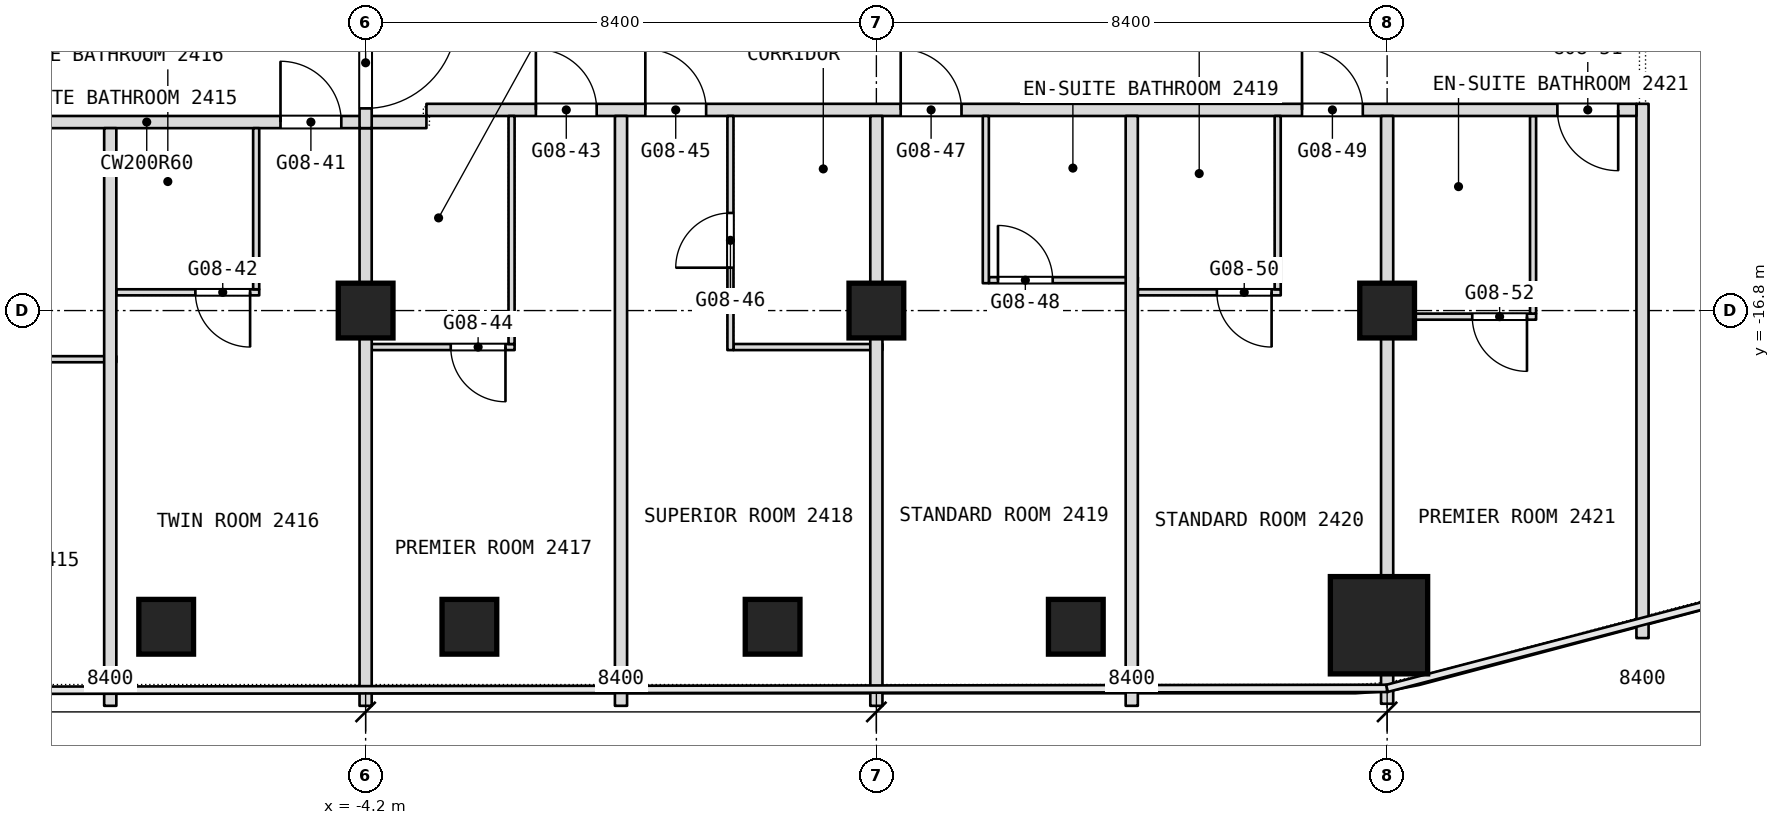
"""IFC4 building model, lengths in metres.
Left out: names, types, materials, properties, quantities, classifications, styles, units other than length and angle.
Written with IfcOpenShell. Run it as: python <this file> out.ifc"""

import sys

from ifc_helpers import new_model, si_unit, direction, frame, frame_2d, origin, origin_2d, place, context, subcontext, project, spatial, rectangle, extrude, element, fill, save


model = new_model("IFC4")
c1 = context("Model", 3, precision=1e-05, world=origin(), true_north=direction((0.0, 1.0)))
c2 = subcontext(c1, "Body", "Model", "MODEL_VIEW")
j1 = project(units=[si_unit("LENGTHUNIT", "METRE"), si_unit("PLANEANGLEUNIT", "RADIAN")], contexts=[c1])
p1 = place(None, origin())
s1 = spatial("IfcSite", under=j1, at=p1, CompositionType="ELEMENT")
p2 = place(p1, origin())
s2 = spatial("IfcBuilding", under=s1, at=p2, CompositionType="ELEMENT")
p3 = place(p2, frame((0.0, 0.0, 112.1)))
s3 = spatial("IfcBuildingStorey", under=s2, at=p3, CompositionType="ELEMENT", Elevation=112.1)
p4 = place(p3, frame((12.466, -21.975, 0.0), z_axis=(0.0, 0.0, 1.0), x_axis=(1.0, 0.0, 0.0)))
e1 = element("IfcColumn", 1, at=p4, inside=s3, PredefinedType="COLUMN", context=c2, shape_type="SweptSolid", body=[
    extrude(rectangle(XDim=1.6, YDim=1.6, at=origin_2d()), origin(), (0.0, 0.0, 1.0), 3.6),
])
for number, where, z_axis, x_axis in (
    (2, (-4.2, -16.8, 0.0), (0.0, 0.0, 1.0), (1.0, 0.0, 0.0)),
    (3, (4.2, -16.8, 0.0), (0.0, 0.0, 1.0), (1.0, 0.0, 0.0)),
    (4, (12.6, -16.8, 0.0), (0.0, 0.0, 1.0), (1.0, 0.0, 0.0)),
    (5, (7.48, -22.0, 0.0), (0.0, 0.0, 1.0), (1.0, 0.0, 0.0)),
    (6, (2.493, -22.0, 0.0), (0.0, 0.0, 1.0), (1.0, 0.0, 0.0)),
    (7, (-2.493, -22.0, 0.0), (0.0, 0.0, 1.0), (1.0, 0.0, 0.0)),
    (8, (-7.48, -22.0, 0.0), (0.0, 0.0, 1.0), (1.0, 0.0, 0.0)),
):
    element("IfcColumn", number, at=place(p3, frame(where, z_axis=z_axis, x_axis=x_axis)), inside=s3, PredefinedType="COLUMN", context=c2, shape_type="SweptSolid", body=[
        extrude(rectangle(XDim=0.9, YDim=0.9, at=origin_2d()), origin(), (0.0, 0.0, 1.0), 3.6),
    ])
p5 = place(p3, frame((-10.75, -17.6, 0.0), z_axis=(0.0, 0.0, 1.0), x_axis=(1.0, 0.0, 0.0)))
e9 = element("IfcWall", 9, at=p5, inside=s3, PredefinedType="PARTITIONING", context=c2, shape_type="SweptSolid", body=[
    extrude(rectangle(XDim=2.45, YDim=0.1, at=frame_2d((1.225, 0.0))), origin(), (0.0, 0.0, 1.0), 3.34),
])
p6 = place(p5, frame((0.15, 0.0, 0.0)))
e10 = element("IfcOpeningElement", 10, at=p6, cuts=e9, PredefinedType="OPENING", context=c2, shape_type="SweptSolid", body=[
    extrude(rectangle(XDim=0.9, YDim=2.1, at=frame_2d((0.45, 1.05))), frame((0.0, 0.05, 0.0), z_axis=(0.0, -1.0, 0.0), x_axis=(1.0, 0.0, 0.0)), (0.0, 0.0, 1.0), 0.1),
])
p7 = place(p3, frame((-4.1, -17.4, 0.0), z_axis=(0.0, 0.0, 1.0), x_axis=(1.0, 0.0, 0.0)))
e11 = element("IfcWall", 11, at=p7, inside=s3, PredefinedType="PARTITIONING", context=c2, shape_type="SweptSolid", body=[
    extrude(rectangle(XDim=2.35, YDim=0.1, at=frame_2d((1.175, 0.0))), origin(), (0.0, 0.0, 1.0), 3.34),
])
p8 = place(p7, frame((1.3, 0.0, 0.0)))
e12 = element("IfcOpeningElement", 12, at=p8, cuts=e11, PredefinedType="OPENING", context=c2, shape_type="SweptSolid", body=[
    extrude(rectangle(XDim=0.9, YDim=2.1, at=frame_2d((0.45, 1.05))), frame((0.0, 0.05, 0.0), z_axis=(0.0, -1.0, 0.0), x_axis=(1.0, 0.0, 0.0)), (0.0, 0.0, 1.0), 0.1),
])
p9 = place(p3, frame((1.85, -17.4, 0.0), z_axis=(0.0, 0.0, 1.0), x_axis=(1.0, 0.0, 0.0)))
e13 = element("IfcWall", 13, at=p9, inside=s3, PredefinedType="PARTITIONING", context=c2, shape_type="SweptSolid", body=[
    extrude(rectangle(XDim=2.45, YDim=0.1, at=frame_2d((1.225, 0.0))), origin(), (0.0, 0.0, 1.0), 3.34),
])
p10 = place(p3, frame((12.7, -16.9, 0.0), z_axis=(0.0, 0.0, 1.0), x_axis=(1.0, 0.0, 0.0)))
e14 = element("IfcWall", 14, at=p10, inside=s3, PredefinedType="PARTITIONING", context=c2, shape_type="SweptSolid", body=[
    extrude(rectangle(XDim=2.35, YDim=0.1, at=frame_2d((1.175, 0.0))), origin(), (0.0, 0.0, 1.0), 2.89),
])
p11 = place(p10, frame((1.3, 0.0, 0.0)))
e15 = element("IfcOpeningElement", 15, at=p11, cuts=e14, PredefinedType="OPENING", context=c2, shape_type="SweptSolid", body=[
    extrude(rectangle(XDim=0.9, YDim=2.1, at=frame_2d((0.45, 1.05))), frame((0.0, 0.05, 0.0), z_axis=(0.0, -1.0, 0.0), x_axis=(1.0, 0.0, 0.0)), (0.0, 0.0, 1.0), 0.1),
])
p12 = place(p3, frame((16.8, -22.186, 0.0), z_axis=(0.0, 0.0, 1.0), x_axis=(0.0, 1.0, 0.0)))
e16 = element("IfcWall", 16, at=p12, inside=s3, PredefinedType="PARTITIONING", context=c2, shape_type="SweptSolid", body=[
    extrude(rectangle(XDim=8.786, YDim=0.2, at=frame_2d((4.393, 0.0))), origin(), (0.0, 0.0, 1.0), 3.34),
])
p13 = place(p3, frame((-8.3, -16.5, 0.0), z_axis=(0.0, 0.0, 1.0), x_axis=(1.0, 0.0, 0.0)))
e17 = element("IfcWall", 17, at=p13, inside=s3, PredefinedType="PARTITIONING", context=c2, shape_type="SweptSolid", body=[
    extrude(rectangle(XDim=2.35, YDim=0.1, at=frame_2d((1.175, 0.0))), origin(), (0.0, 0.0, 1.0), 3.34),
])
p14 = place(p13, frame((1.3, 0.0, 0.0)))
e18 = element("IfcOpeningElement", 18, at=p14, cuts=e17, PredefinedType="OPENING", context=c2, shape_type="SweptSolid", body=[
    extrude(rectangle(XDim=0.9, YDim=2.1, at=frame_2d((0.45, 1.05))), frame((0.0, 0.05, 0.0), z_axis=(0.0, -1.0, 0.0), x_axis=(1.0, 0.0, 0.0)), (0.0, 0.0, 1.0), 0.1),
])
p15 = place(p3, frame((8.5, -16.5, 0.0), z_axis=(0.0, 0.0, 1.0), x_axis=(1.0, 0.0, 0.0)))
e19 = element("IfcWall", 19, at=p15, inside=s3, PredefinedType="PARTITIONING", context=c2, shape_type="SweptSolid", body=[
    extrude(rectangle(XDim=2.35, YDim=0.1, at=frame_2d((1.175, 0.0))), origin(), (0.0, 0.0, 1.0), 3.34),
])
p16 = place(p15, frame((1.3, 0.0, 0.0)))
e20 = element("IfcOpeningElement", 20, at=p16, cuts=e19, PredefinedType="OPENING", context=c2, shape_type="SweptSolid", body=[
    extrude(rectangle(XDim=0.9, YDim=2.1, at=frame_2d((0.45, 1.05))), frame((0.0, 0.05, 0.0), z_axis=(0.0, -1.0, 0.0), x_axis=(1.0, 0.0, 0.0)), (0.0, 0.0, 1.0), 0.1),
])
p17 = place(p3, frame((6.05, -16.3, 0.0), z_axis=(0.0, 0.0, 1.0), x_axis=(1.0, 0.0, 0.0)))
e21 = element("IfcWall", 21, at=p17, inside=s3, PredefinedType="PARTITIONING", context=c2, shape_type="SweptSolid", body=[
    extrude(rectangle(XDim=2.45, YDim=0.1, at=frame_2d((1.225, 0.0))), origin(), (0.0, 0.0, 1.0), 3.34),
])
p18 = place(p17, frame((0.15, 0.0, 0.0)))
e22 = element("IfcOpeningElement", 22, at=p18, cuts=e21, PredefinedType="OPENING", context=c2, shape_type="SweptSolid", body=[
    extrude(rectangle(XDim=0.9, YDim=2.1, at=frame_2d((0.45, 1.05))), frame((0.0, 0.05, 0.0), z_axis=(0.0, -1.0, 0.0), x_axis=(1.0, 0.0, 0.0)), (0.0, 0.0, 1.0), 0.1),
])
p19 = place(p3, frame((15.0, -16.85, 0.0), z_axis=(0.0, 0.0, 1.0), x_axis=(0.0, 1.0, 0.0)))
e23 = element("IfcWall", 23, at=p19, inside=s3, PredefinedType="PARTITIONING", context=c2, shape_type="SweptSolid", body=[
    extrude(rectangle(XDim=3.25, YDim=0.1, at=frame_2d((1.625, 0.0))), origin(), (0.0, 0.0, 1.0), 3.34),
])
p20 = place(p3, frame((-12.4, -13.7, 0.0), z_axis=(0.0, 0.0, 1.0), x_axis=(1.0, 0.0, 0.0)))
e24 = element("IfcWall", 24, at=p20, inside=s3, PredefinedType="PARTITIONING", context=c2, shape_type="SweptSolid", body=[
    extrude(rectangle(XDim=9.2, YDim=0.2, at=frame_2d((4.6, 0.0))), origin(), (0.0, 0.0, 1.0), 3.34),
])
p21 = place(p20, frame((0.2, 0.0, 0.0)))
e25 = element("IfcOpeningElement", 25, at=p21, cuts=e24, PredefinedType="OPENING", context=c2, shape_type="SweptSolid", body=[
    extrude(rectangle(XDim=1.0, YDim=2.1, at=frame_2d((0.5, 1.05))), frame((0.0, 0.1, 0.0), z_axis=(0.0, -1.0, 0.0), x_axis=(1.0, 0.0, 0.0)), (0.0, 0.0, 1.0), 0.2),
])
p22 = place(p20, frame((6.8, 0.0, 0.0)))
e26 = element("IfcOpeningElement", 26, at=p22, cuts=e24, PredefinedType="OPENING", context=c2, shape_type="SweptSolid", body=[
    extrude(rectangle(XDim=1.0, YDim=2.1, at=frame_2d((0.5, 1.05))), frame((0.0, 0.1, 0.0), z_axis=(0.0, -1.0, 0.0), x_axis=(1.0, 0.0, 0.0)), (0.0, 0.0, 1.0), 0.2),
])
p23 = place(p3, frame((-3.2, -13.5, 0.0), z_axis=(0.0, 0.0, 1.0), x_axis=(1.0, 0.0, 0.0)))
e27 = element("IfcWall", 27, at=p23, inside=s3, PredefinedType="PARTITIONING", context=c2, shape_type="SweptSolid", body=[
    extrude(rectangle(XDim=19.9, YDim=0.2, at=frame_2d((9.95, 0.0))), origin(), (0.0, 0.0, 1.0), 3.34),
])
p24 = place(p23, frame((1.8, 0.0, 0.0)))
e28 = element("IfcOpeningElement", 28, at=p24, cuts=e27, PredefinedType="OPENING", context=c2, shape_type="SweptSolid", body=[
    extrude(rectangle(XDim=1.0, YDim=2.1, at=frame_2d((0.5, 1.05))), frame((0.0, 0.1, 0.0), z_axis=(0.0, -1.0, 0.0), x_axis=(1.0, 0.0, 0.0)), (0.0, 0.0, 1.0), 0.2),
])
p25 = place(p23, frame((3.6, 0.0, 0.0)))
e29 = element("IfcOpeningElement", 29, at=p25, cuts=e27, PredefinedType="OPENING", context=c2, shape_type="SweptSolid", body=[
    extrude(rectangle(XDim=1.0, YDim=2.1, at=frame_2d((0.5, 1.05))), frame((0.0, 0.1, 0.0), z_axis=(0.0, -1.0, 0.0), x_axis=(1.0, 0.0, 0.0)), (0.0, 0.0, 1.0), 0.2),
])
p26 = place(p23, frame((7.8, 0.0, 0.0)))
e30 = element("IfcOpeningElement", 30, at=p26, cuts=e27, PredefinedType="OPENING", context=c2, shape_type="SweptSolid", body=[
    extrude(rectangle(XDim=1.0, YDim=2.1, at=frame_2d((0.5, 1.05))), frame((0.0, 0.1, 0.0), z_axis=(0.0, -1.0, 0.0), x_axis=(1.0, 0.0, 0.0)), (0.0, 0.0, 1.0), 0.2),
])
p27 = place(p23, frame((14.4, 0.0, 0.0)))
e31 = element("IfcOpeningElement", 31, at=p27, cuts=e27, PredefinedType="OPENING", context=c2, shape_type="SweptSolid", body=[
    extrude(rectangle(XDim=1.0, YDim=2.1, at=frame_2d((0.5, 1.05))), frame((0.0, 0.1, 0.0), z_axis=(0.0, -1.0, 0.0), x_axis=(1.0, 0.0, 0.0)), (0.0, 0.0, 1.0), 0.2),
])
p28 = place(p23, frame((18.6, 0.0, 0.0)))
e32 = element("IfcOpeningElement", 32, at=p28, cuts=e27, PredefinedType="OPENING", context=c2, shape_type="SweptSolid", body=[
    extrude(rectangle(XDim=1.0, YDim=2.1, at=frame_2d((0.5, 1.05))), frame((0.0, 0.1, 0.0), z_axis=(0.0, -1.0, 0.0), x_axis=(1.0, 0.0, 0.0)), (0.0, 0.0, 1.0), 0.2),
])
p29 = place(p3, frame((12.6, -23.266, 0.0), z_axis=(0.0, 0.0, 1.0), x_axis=(0.0, 1.0, 0.0)))
e33 = element("IfcWall", 33, at=p29, inside=s3, PredefinedType="PARTITIONING", context=c2, shape_type="SweptSolid", body=[
    extrude(rectangle(XDim=0.491, YDim=0.2, at=frame_2d((0.246, 0.0))), origin(), (0.0, 0.0, 1.0), 3.34),
])
p30 = place(p3, frame((12.6, -21.175, 0.0), z_axis=(0.0, 0.0, 1.0), x_axis=(0.0, 1.0, 0.0)))
e34 = element("IfcWall", 34, at=p30, inside=s3, PredefinedType="PARTITIONING", context=c2, shape_type="SweptSolid", body=[
    extrude(rectangle(XDim=7.575, YDim=0.2, at=frame_2d((3.788, 0.0))), origin(), (0.0, 0.0, 1.0), 3.34),
])
p31 = place(p3, frame((10.8, -16.45, 0.0), z_axis=(0.0, 0.0, 1.0), x_axis=(0.0, 1.0, 0.0)))
e35 = element("IfcWall", 35, at=p31, inside=s3, PredefinedType="PARTITIONING", context=c2, shape_type="SweptSolid", body=[
    extrude(rectangle(XDim=2.85, YDim=0.1, at=frame_2d((1.425, 0.0))), origin(), (0.0, 0.0, 1.0), 3.34),
])
p32 = place(p3, frame((8.4, -23.3, 0.0), z_axis=(0.0, 0.0, 1.0), x_axis=(0.0, 1.0, 0.0)))
e36 = element("IfcWall", 36, at=p32, inside=s3, PredefinedType="PARTITIONING", context=c2, shape_type="SweptSolid", body=[
    extrude(rectangle(XDim=9.7, YDim=0.2, at=frame_2d((4.85, 0.0))), origin(), (0.0, 0.0, 1.0), 3.34),
])
p33 = place(p3, frame((6.0, -16.35, 0.0), z_axis=(0.0, 0.0, 1.0), x_axis=(0.0, 1.0, 0.0)))
e37 = element("IfcWall", 37, at=p33, inside=s3, PredefinedType="PARTITIONING", context=c2, shape_type="SweptSolid", body=[
    extrude(rectangle(XDim=2.75, YDim=0.1, at=frame_2d((1.375, 0.0))), origin(), (0.0, 0.0, 1.0), 3.34),
])
p34 = place(p3, frame((4.2, -23.3, 0.0), z_axis=(0.0, 0.0, 1.0), x_axis=(0.0, 1.0, 0.0)))
e38 = element("IfcWall", 38, at=p34, inside=s3, PredefinedType="PARTITIONING", context=c2, shape_type="SweptSolid", body=[
    extrude(rectangle(XDim=9.7, YDim=0.2, at=frame_2d((4.85, 0.0))), origin(), (0.0, 0.0, 1.0), 3.34),
])
p35 = place(p3, frame((1.8, -17.45, 0.0), z_axis=(0.0, 0.0, 1.0), x_axis=(0.0, 1.0, 0.0)))
e39 = element("IfcWall", 39, at=p35, inside=s3, PredefinedType="PARTITIONING", context=c2, shape_type="SweptSolid", body=[
    extrude(rectangle(XDim=3.85, YDim=0.1, at=frame_2d((1.925, 0.0))), origin(), (0.0, 0.0, 1.0), 3.34),
])
p36 = place(p35, frame((1.355, 0.0, 0.0)))
e40 = element("IfcOpeningElement", 40, at=p36, cuts=e39, PredefinedType="OPENING", context=c2, shape_type="SweptSolid", body=[
    extrude(rectangle(XDim=0.9, YDim=2.1, at=frame_2d((0.45, 1.05))), frame((0.0, 0.05, 0.0), z_axis=(0.0, -1.0, 0.0), x_axis=(1.0, 0.0, 0.0)), (0.0, 0.0, 1.0), 0.1),
])
p37 = place(p3, frame((0.0, -23.3, 0.0), z_axis=(0.0, 0.0, 1.0), x_axis=(0.0, 1.0, 0.0)))
e41 = element("IfcWall", 41, at=p37, inside=s3, PredefinedType="PARTITIONING", context=c2, shape_type="SweptSolid", body=[
    extrude(rectangle(XDim=9.7, YDim=0.2, at=frame_2d((4.85, 0.0))), origin(), (0.0, 0.0, 1.0), 3.34),
])
p38 = place(p3, frame((-1.8, -17.35, 0.0), z_axis=(0.0, 0.0, 1.0), x_axis=(0.0, 1.0, 0.0)))
e42 = element("IfcWall", 42, at=p38, inside=s3, PredefinedType="PARTITIONING", context=c2, shape_type="SweptSolid", body=[
    extrude(rectangle(XDim=3.75, YDim=0.1, at=frame_2d((1.875, 0.0))), origin(), (0.0, 0.0, 1.0), 3.34),
])
p39 = place(p3, frame((-4.2, -23.3, 0.0), z_axis=(0.0, 0.0, 1.0), x_axis=(0.0, 1.0, 0.0)))
e43 = element("IfcWall", 43, at=p39, inside=s3, PredefinedType="PARTITIONING", context=c2, shape_type="SweptSolid", body=[
    extrude(rectangle(XDim=9.5, YDim=0.2, at=frame_2d((4.75, 0.0))), origin(), (0.0, 0.0, 1.0), 3.34),
])
p40 = place(p3, frame((-4.2, -13.8, 0.0), z_axis=(0.0, 0.0, 1.0), x_axis=(0.0, 1.0, 0.0)))
e44 = element("IfcWall", 44, at=p40, inside=s3, PredefinedType="PARTITIONING", context=c2, shape_type="SweptSolid", body=[
    extrude(rectangle(XDim=13.8, YDim=0.2, at=frame_2d((6.9, 0.0))), origin(), (0.0, 0.0, 1.0), 3.34),
])
p41 = place(p40, frame((12.15, 0.0, 0.0)))
e45 = element("IfcOpeningElement", 45, at=p41, cuts=e44, PredefinedType="OPENING", context=c2, shape_type="SweptSolid", body=[
    extrude(rectangle(XDim=1.5, YDim=2.1, at=frame_2d((0.75, 1.05))), frame((0.0, 0.1, 0.0), z_axis=(0.0, -1.0, 0.0), x_axis=(1.0, 0.0, 0.0)), (0.0, 0.0, 1.0), 0.2),
])
p42 = place(p40, frame((0.325, 0.0, 0.0)))
e46 = element("IfcOpeningElement", 46, at=p42, cuts=e44, PredefinedType="OPENING", context=c2, shape_type="SweptSolid", body=[
    extrude(rectangle(XDim=1.5, YDim=2.1, at=frame_2d((0.75, 1.05))), frame((0.0, 0.1, 0.0), z_axis=(0.0, -1.0, 0.0), x_axis=(1.0, 0.0, 0.0)), (0.0, 0.0, 1.0), 0.2),
])
p43 = place(p3, frame((-6.0, -16.45, 0.0), z_axis=(0.0, 0.0, 1.0), x_axis=(0.0, 1.0, 0.0)))
e47 = element("IfcWall", 47, at=p43, inside=s3, PredefinedType="PARTITIONING", context=c2, shape_type="SweptSolid", body=[
    extrude(rectangle(XDim=2.65, YDim=0.1, at=frame_2d((1.325, 0.0))), origin(), (0.0, 0.0, 1.0), 3.34),
])
p44 = place(p3, frame((-8.4, -23.3, 0.0), z_axis=(0.0, 0.0, 1.0), x_axis=(0.0, 1.0, 0.0)))
e48 = element("IfcWall", 48, at=p44, inside=s3, PredefinedType="PARTITIONING", context=c2, shape_type="SweptSolid", body=[
    extrude(rectangle(XDim=9.5, YDim=0.2, at=frame_2d((4.75, 0.0))), origin(), (0.0, 0.0, 1.0), 3.34),
])
p45 = place(p8, origin())
e49 = element("IfcDoor", 49, at=p45, inside=s3, OperationType="SINGLE_SWING_RIGHT", PredefinedType="DOOR", context=c2, shape_type="SweptSolid", body=[
    extrude(rectangle(XDim=0.9, YDim=2.1, at=frame_2d((0.45, 1.05))), frame((0.0, 0.025, 0.0), z_axis=(0.0, -1.0, 0.0), x_axis=(1.0, 0.0, 0.0)), (0.0, 0.0, 1.0), 0.05),
])
fill(e12, e49)
p46 = place(p11, origin())
e50 = element("IfcDoor", 50, at=p46, inside=s3, OperationType="SINGLE_SWING_RIGHT", PredefinedType="DOOR", context=c2, shape_type="SweptSolid", body=[
    extrude(rectangle(XDim=0.9, YDim=2.1, at=frame_2d((0.45, 1.05))), frame((0.0, 0.025, 0.0), z_axis=(0.0, -1.0, 0.0), x_axis=(1.0, 0.0, 0.0)), (0.0, 0.0, 1.0), 0.05),
])
fill(e15, e50)
p47 = place(p14, origin())
e51 = element("IfcDoor", 51, at=p47, inside=s3, OperationType="SINGLE_SWING_RIGHT", PredefinedType="DOOR", context=c2, shape_type="SweptSolid", body=[
    extrude(rectangle(XDim=0.9, YDim=2.1, at=frame_2d((0.45, 1.05))), frame((0.0, 0.025, 0.0), z_axis=(0.0, -1.0, 0.0), x_axis=(1.0, 0.0, 0.0)), (0.0, 0.0, 1.0), 0.05),
])
fill(e18, e51)
p48 = place(p16, origin())
e52 = element("IfcDoor", 52, at=p48, inside=s3, OperationType="SINGLE_SWING_RIGHT", PredefinedType="DOOR", context=c2, shape_type="SweptSolid", body=[
    extrude(rectangle(XDim=0.9, YDim=2.1, at=frame_2d((0.45, 1.05))), frame((0.0, 0.025, 0.0), z_axis=(0.0, -1.0, 0.0), x_axis=(1.0, 0.0, 0.0)), (0.0, 0.0, 1.0), 0.05),
])
fill(e20, e52)
p49 = place(p18, origin())
e53 = element("IfcDoor", 53, at=p49, inside=s3, OperationType="SINGLE_SWING_LEFT", PredefinedType="DOOR", context=c2, shape_type="SweptSolid", body=[
    extrude(rectangle(XDim=0.9, YDim=2.1, at=frame_2d((0.45, 1.05))), frame((0.0, 0.025, 0.0), z_axis=(0.0, -1.0, 0.0), x_axis=(1.0, 0.0, 0.0)), (0.0, 0.0, 1.0), 0.05),
])
fill(e22, e53)
p50 = place(p22, origin())
e54 = element("IfcDoor", 54, at=p50, inside=s3, OperationType="SINGLE_SWING_LEFT", PredefinedType="DOOR", context=c2, shape_type="SweptSolid", body=[
    extrude(rectangle(XDim=1.0, YDim=2.1, at=frame_2d((0.5, 1.05))), frame((0.0, 0.025, 0.0), z_axis=(0.0, -1.0, 0.0), x_axis=(1.0, 0.0, 0.0)), (0.0, 0.0, 1.0), 0.05),
])
fill(e26, e54)
p51 = place(p24, origin())
e55 = element("IfcDoor", 55, at=p51, inside=s3, OperationType="SINGLE_SWING_LEFT", PredefinedType="DOOR", context=c2, shape_type="SweptSolid", body=[
    extrude(rectangle(XDim=1.0, YDim=2.1, at=frame_2d((0.5, 1.05))), frame((0.0, 0.025, 0.0), z_axis=(0.0, -1.0, 0.0), x_axis=(1.0, 0.0, 0.0)), (0.0, 0.0, 1.0), 0.05),
])
fill(e28, e55)
p52 = place(p25, origin())
e56 = element("IfcDoor", 56, at=p52, inside=s3, OperationType="SINGLE_SWING_LEFT", PredefinedType="DOOR", context=c2, shape_type="SweptSolid", body=[
    extrude(rectangle(XDim=1.0, YDim=2.1, at=frame_2d((0.5, 1.05))), frame((0.0, 0.025, 0.0), z_axis=(0.0, -1.0, 0.0), x_axis=(1.0, 0.0, 0.0)), (0.0, 0.0, 1.0), 0.05),
])
fill(e29, e56)
p53 = place(p26, origin())
e57 = element("IfcDoor", 57, at=p53, inside=s3, OperationType="SINGLE_SWING_LEFT", PredefinedType="DOOR", context=c2, shape_type="SweptSolid", body=[
    extrude(rectangle(XDim=1.0, YDim=2.1, at=frame_2d((0.5, 1.05))), frame((0.0, 0.025, 0.0), z_axis=(0.0, -1.0, 0.0), x_axis=(1.0, 0.0, 0.0)), (0.0, 0.0, 1.0), 0.05),
])
fill(e30, e57)
p54 = place(p27, origin())
e58 = element("IfcDoor", 58, at=p54, inside=s3, OperationType="SINGLE_SWING_LEFT", PredefinedType="DOOR", context=c2, shape_type="SweptSolid", body=[
    extrude(rectangle(XDim=1.0, YDim=2.1, at=frame_2d((0.5, 1.05))), frame((0.0, 0.025, 0.0), z_axis=(0.0, -1.0, 0.0), x_axis=(1.0, 0.0, 0.0)), (0.0, 0.0, 1.0), 0.05),
])
fill(e31, e58)
p55 = place(p28, origin())
e59 = element("IfcDoor", 59, at=p55, inside=s3, OperationType="SINGLE_SWING_LEFT", PredefinedType="DOOR", context=c2, shape_type="SweptSolid", body=[
    extrude(rectangle(XDim=1.0, YDim=2.1, at=frame_2d((0.5, 1.05))), frame((0.0, 0.025, 0.0), z_axis=(0.0, -1.0, 0.0), x_axis=(1.0, 0.0, 0.0)), (0.0, 0.0, 1.0), 0.05),
])
fill(e32, e59)
p56 = place(p36, origin())
e60 = element("IfcDoor", 60, at=p56, inside=s3, OperationType="SINGLE_SWING_RIGHT", PredefinedType="DOOR", context=c2, shape_type="SweptSolid", body=[
    extrude(rectangle(XDim=0.9, YDim=2.1, at=frame_2d((0.45, 1.05))), frame((0.0, 0.025, 0.0), z_axis=(0.0, -1.0, 0.0), x_axis=(1.0, 0.0, 0.0)), (0.0, 0.0, 1.0), 0.05),
])
fill(e40, e60)
p57 = place(p42, origin())
e61 = element("IfcDoor", 61, at=p57, inside=s3, OperationType="DOUBLE_DOOR_DOUBLE_SWING", PredefinedType="DOOR", context=c2, shape_type="SweptSolid", body=[
    extrude(rectangle(XDim=1.5, YDim=2.1, at=frame_2d((0.75, 1.05))), frame((0.0, 0.025, 0.0), z_axis=(0.0, -1.0, 0.0), x_axis=(1.0, 0.0, 0.0)), (0.0, 0.0, 1.0), 0.05),
])
fill(e46, e61)
save(model, sys.argv[1])
